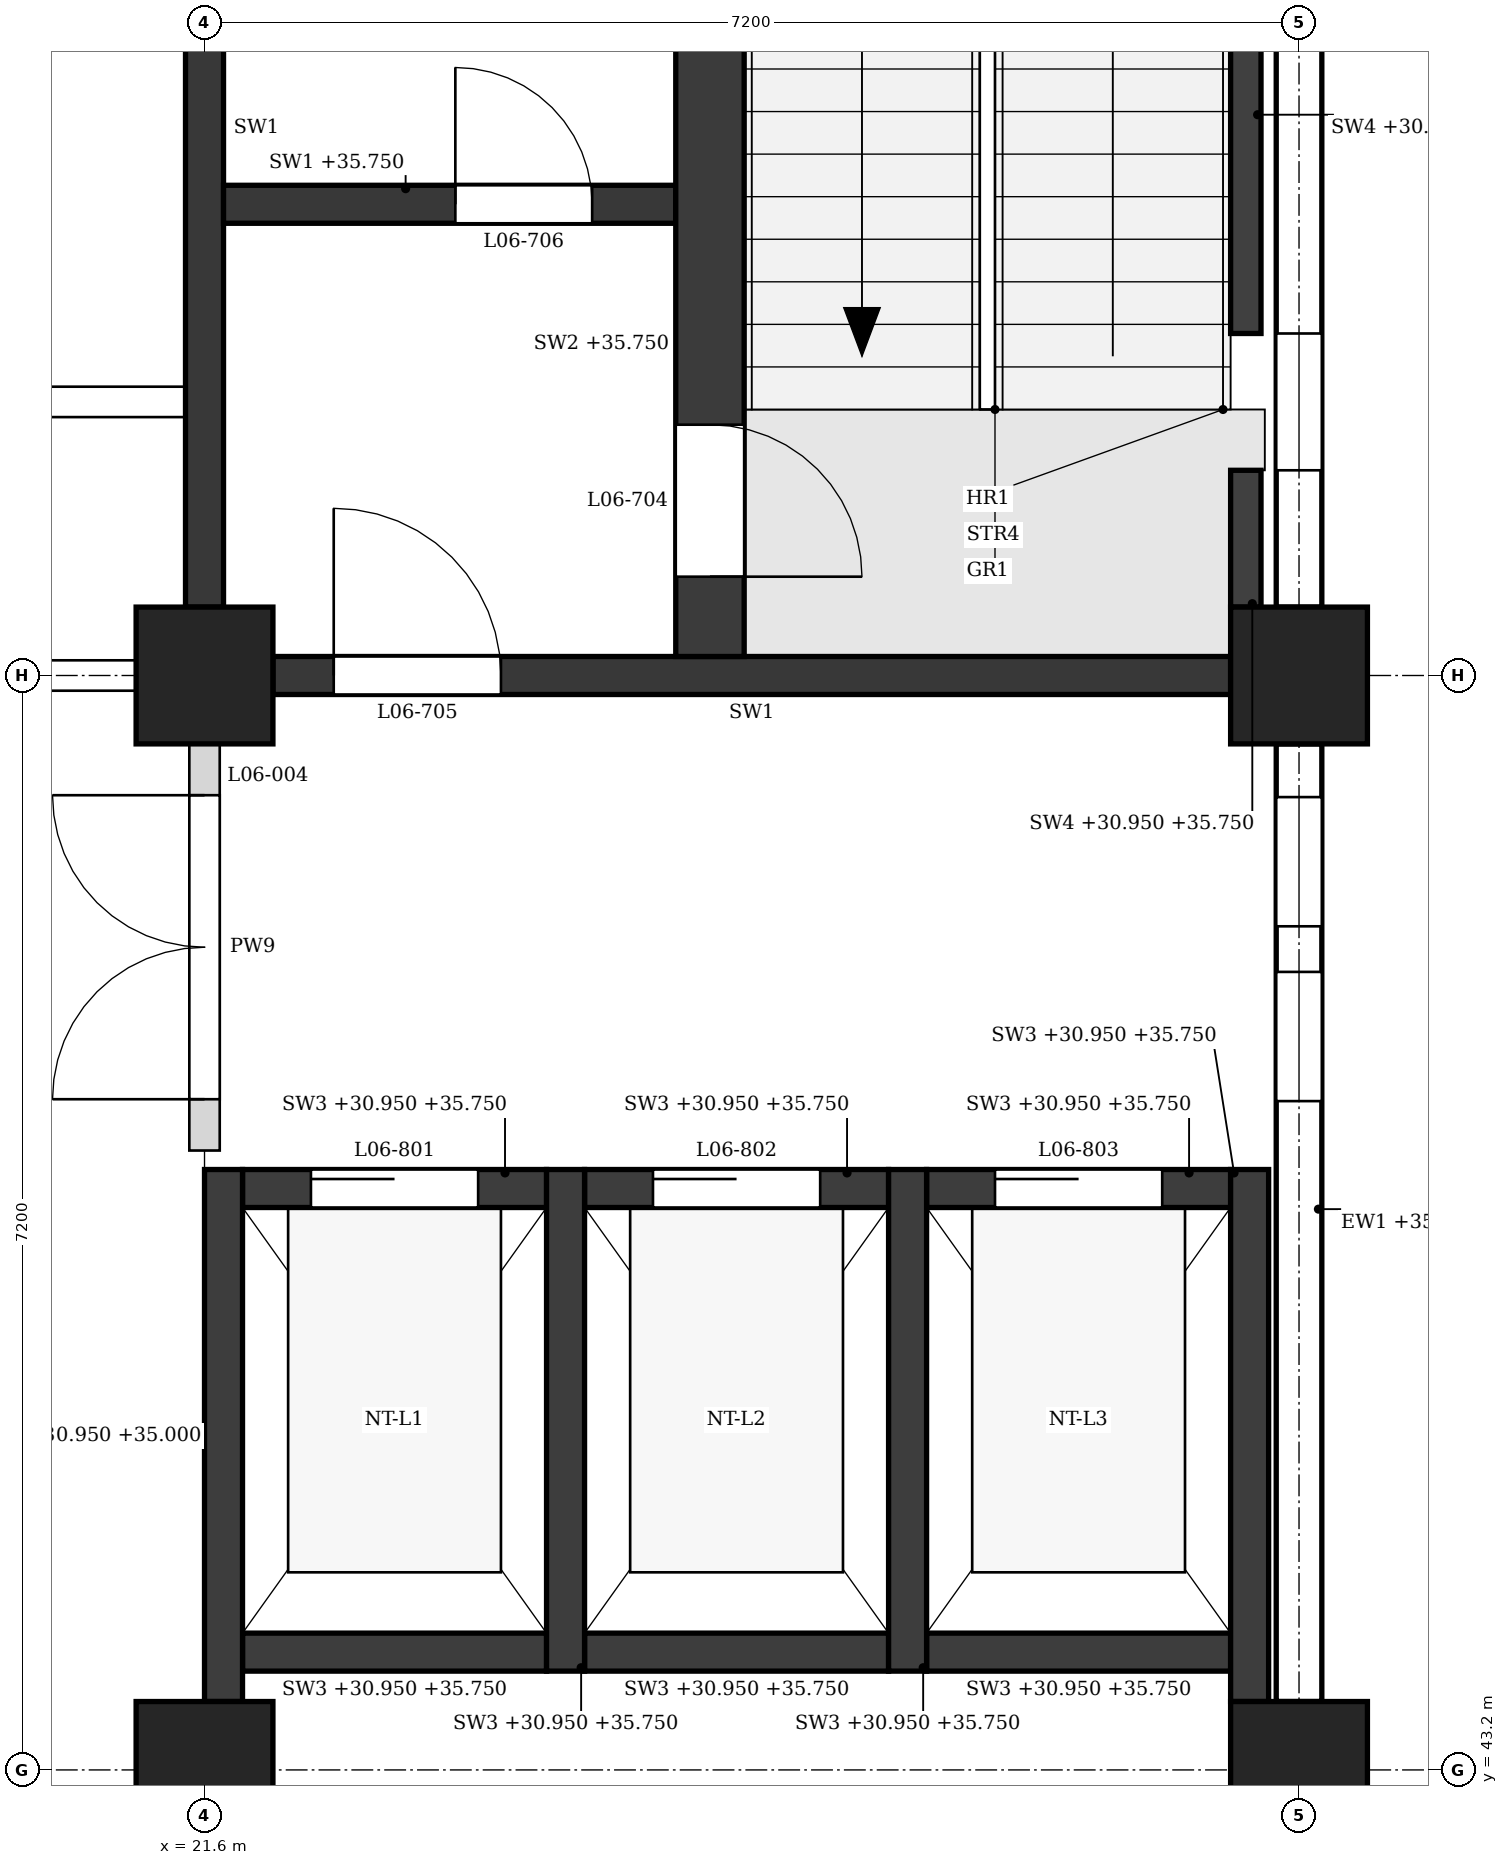
"""IFC4 building model, lengths in metres.
Left out: names, types, materials, properties, quantities, classifications, styles, units other than length and angle.
Written with IfcOpenShell. Run it as: python <this file> out.ifc"""

import sys

from ifc_helpers import new_model, si_unit, direction, frame, frame_2d, origin, origin_2d, place, context, subcontext, project, spatial, polyline, rectangle, outline, extrude, element, fill, save


model = new_model("IFC4")
c1 = context("Model", 3, precision=1e-05, world=origin(), true_north=direction((0.0, 1.0)))
c2 = subcontext(c1, "Body", "Model", "MODEL_VIEW")
j1 = project(units=[si_unit("LENGTHUNIT", "METRE"), si_unit("PLANEANGLEUNIT", "RADIAN")], contexts=[c1])
p1 = place(None, origin())
s1 = spatial("IfcSite", under=j1, at=p1, CompositionType="ELEMENT")
p2 = place(p1, origin())
s2 = spatial("IfcBuilding", under=s1, at=p2, CompositionType="ELEMENT")
p3 = place(p2, frame((0.0, 0.0, 31.2)))
s3 = spatial("IfcBuildingStorey", under=s2, at=p3, CompositionType="ELEMENT", Elevation=31.2)
for number, where, z_axis, x_axis in (
    (1, (21.6, 43.2, 0.0), (0.0, 0.0, 1.0), (1.0, 0.0, 0.0)),
    (2, (21.6, 50.4, 0.0), (0.0, 0.0, 1.0), (1.0, 0.0, 0.0)),
    (3, (28.8, 43.2, 0.0), (0.0, 0.0, 1.0), (1.0, 0.0, 0.0)),
    (4, (28.8, 50.4, 0.0), (0.0, 0.0, 1.0), (1.0, 0.0, 0.0)),
):
    element("IfcColumn", number, at=place(p3, frame(where, z_axis=z_axis, x_axis=x_axis)), inside=s3, PredefinedType="COLUMN", context=c2, shape_type="SweptSolid", body=[
        extrude(rectangle(XDim=0.9, YDim=0.9, at=origin_2d()), origin(), (0.0, 0.0, 1.0), 4.8),
    ])
p4 = place(p3, frame((28.8, 43.65, 0.0), z_axis=(0.0, 0.0, 1.0), x_axis=(0.0, 1.0, 0.0)))
e5 = element("IfcWall", 5, at=p4, inside=s3, PredefinedType="STANDARD", context=c2, shape_type="SweptSolid", body=[
    extrude(rectangle(XDim=6.3, YDim=0.3, at=frame_2d((3.15, 0.0))), origin(), (0.0, 0.0, 1.0), 3.95),
])
p5 = place(p4, frame((3.95, 0.0, 0.9)))
e6 = element("IfcOpeningElement", 6, at=p5, cuts=e5, PredefinedType="OPENING", context=c2, shape_type="SweptSolid", body=[
    extrude(outline(polyline([(0.0, 0.0), (0.85, 0.0), (0.85, 2.05), (0.425, 2.5), (0.0, 2.05), (0.0, 0.0)])), frame((0.0, 0.16, 0.0), z_axis=(0.0, -1.0, 0.0), x_axis=(1.0, 0.0, 0.0)), (0.0, 0.0, 1.0), 0.32),
])
p6 = place(p4, frame((5.1, 0.0, 0.9)))
e7 = element("IfcOpeningElement", 7, at=p6, cuts=e5, PredefinedType="OPENING", context=c2, shape_type="SweptSolid", body=[
    extrude(outline(polyline([(0.0, 0.0), (0.85, 0.0), (0.85, 2.05), (0.425, 2.5), (0.0, 2.05), (0.0, 0.0)])), frame((0.0, 0.16, 0.0), z_axis=(0.0, -1.0, 0.0), x_axis=(1.0, 0.0, 0.0)), (0.0, 0.0, 1.0), 0.32),
])
p7 = place(p3, frame((28.8, 50.85, 0.0), z_axis=(0.0, 0.0, 1.0), x_axis=(0.0, 1.0, 0.0)))
e8 = element("IfcWall", 8, at=p7, inside=s3, PredefinedType="STANDARD", context=c2, shape_type="SweptSolid", body=[
    extrude(rectangle(XDim=6.3, YDim=0.3, at=frame_2d((3.15, 0.0))), origin(), (0.0, 0.0, 1.0), 3.95),
])
p8 = place(p7, frame((0.9, 0.0, 0.9)))
e9 = element("IfcOpeningElement", 9, at=p8, cuts=e8, PredefinedType="OPENING", context=c2, shape_type="SweptSolid", body=[
    extrude(outline(polyline([(0.0, 0.0), (0.9, 0.0), (0.9, 2.05), (0.45, 2.5), (0.0, 2.05), (0.0, 0.0)])), frame((0.0, 0.16, 0.0), z_axis=(0.0, -1.0, 0.0), x_axis=(1.0, 0.0, 0.0)), (0.0, 0.0, 1.0), 0.32),
])
p9 = place(p7, frame((4.5, 0.0, 0.9)))
e10 = element("IfcOpeningElement", 10, at=p9, cuts=e8, PredefinedType="OPENING", context=c2, shape_type="SweptSolid", body=[
    extrude(outline(polyline([(0.0, 0.0), (0.9, 0.0), (0.9, 2.05), (0.45, 2.5), (0.0, 2.05), (0.0, 0.0)])), frame((0.0, 0.16, 0.0), z_axis=(0.0, -1.0, 0.0), x_axis=(1.0, 0.0, 0.0)), (0.0, 0.0, 1.0), 0.32),
])
p10 = place(p3, frame((22.05, 50.4, 0.0), z_axis=(0.0, 0.0, 1.0), x_axis=(1.0, 0.0, 0.0)))
e11 = element("IfcWall", 11, at=p10, inside=s3, PredefinedType="SHEAR", context=c2, shape_type="SweptSolid", body=[
    extrude(rectangle(XDim=6.3, YDim=0.25, at=frame_2d((3.15, 0.0))), origin(), (0.0, 0.0, 1.0), 3.8),
])
p11 = place(p10, frame((0.4, 0.0, 0.0)))
e12 = element("IfcOpeningElement", 12, at=p11, cuts=e11, PredefinedType="OPENING", context=c2, shape_type="SweptSolid", body=[
    extrude(rectangle(XDim=1.1, YDim=2.1, at=frame_2d((0.55, 1.05))), frame((0.0, 0.135, 0.0), z_axis=(0.0, -1.0, 0.0), x_axis=(1.0, 0.0, 0.0)), (0.0, 0.0, 1.0), 0.27),
])
p12 = place(p3, frame((21.6, 50.85, 0.0), z_axis=(0.0, 0.0, 1.0), x_axis=(0.0, 1.0, 0.0)))
e13 = element("IfcWall", 13, at=p12, inside=s3, PredefinedType="SHEAR", context=c2, shape_type="SweptSolid", body=[
    extrude(rectangle(XDim=6.3, YDim=0.25, at=frame_2d((3.15, 0.0))), origin(), (0.0, 0.0, 1.0), 3.8),
])
p13 = place(p3, frame((28.45, 50.85, -0.25), z_axis=(0.0, 0.0, 1.0), x_axis=(0.0, 1.0, 0.0)))
e14 = element("IfcWall", 14, at=p13, inside=s3, PredefinedType="SHEAR", context=c2, shape_type="SweptSolid", body=[
    extrude(rectangle(XDim=0.9, YDim=0.2, at=frame_2d((0.45, 0.0))), origin(), (0.0, 0.0, 1.0), 4.8),
])
p14 = place(p3, frame((28.45, 52.65, -0.25), z_axis=(0.0, 0.0, 1.0), x_axis=(0.0, 1.0, 0.0)))
e15 = element("IfcWall", 15, at=p14, inside=s3, PredefinedType="SHEAR", context=c2, shape_type="SweptSolid", body=[
    extrude(rectangle(XDim=2.7, YDim=0.2, at=frame_2d((1.35, 0.0))), origin(), (0.0, 0.0, 1.0), 4.8),
])
p15 = place(p3, frame((24.925, 50.525, 0.0), z_axis=(0.0, 0.0, 1.0), x_axis=(0.0, 1.0, 0.0)))
e16 = element("IfcWall", 16, at=p15, inside=s3, PredefinedType="SHEAR", context=c2, shape_type="SweptSolid", body=[
    extrude(rectangle(XDim=6.85, YDim=0.45, at=frame_2d((3.425, 0.0))), origin(), (0.0, 0.0, 1.0), 4.55),
])
p16 = place(p15, frame((0.525, 0.0, 0.0)))
e17 = element("IfcOpeningElement", 17, at=p16, cuts=e16, PredefinedType="OPENING", context=c2, shape_type="SweptSolid", body=[
    extrude(rectangle(XDim=1.0, YDim=2.1, at=frame_2d((0.5, 1.05))), frame((0.0, 0.235, 0.0), z_axis=(0.0, -1.0, 0.0), x_axis=(1.0, 0.0, 0.0)), (0.0, 0.0, 1.0), 0.47),
])
p17 = place(p3, frame((21.725, 53.5, 0.0), z_axis=(0.0, 0.0, 1.0), x_axis=(1.0, 0.0, 0.0)))
e18 = element("IfcWall", 18, at=p17, inside=s3, PredefinedType="SHEAR", context=c2, shape_type="SweptSolid", body=[
    extrude(rectangle(XDim=2.975, YDim=0.25, at=frame_2d((1.487, 0.0))), origin(), (0.0, 0.0, 1.0), 4.55),
])
p18 = place(p17, frame((1.525, 0.0, 0.0)))
e19 = element("IfcOpeningElement", 19, at=p18, cuts=e18, PredefinedType="OPENING", context=c2, shape_type="SweptSolid", body=[
    extrude(rectangle(XDim=0.9, YDim=2.1, at=frame_2d((0.45, 1.05))), frame((0.0, 0.135, 0.0), z_axis=(0.0, -1.0, 0.0), x_axis=(1.0, 0.0, 0.0)), (0.0, 0.0, 1.0), 0.27),
])
p19 = place(p3, frame((21.725, 43.65, -0.25), z_axis=(0.0, 0.0, 1.0), x_axis=(0.0, 1.0, 0.0)))
e20 = element("IfcWall", 20, at=p19, inside=s3, PredefinedType="SHEAR", context=c2, shape_type="SweptSolid", body=[
    extrude(rectangle(XDim=3.5, YDim=0.25, at=frame_2d((1.75, 0.0))), origin(), (0.0, 0.0, 1.0), 4.05),
])
for number, where, z_axis, x_axis in (
    (21, (23.975, 43.85, -0.25), (0.0, 0.0, 1.0), (0.0, 1.0, 0.0)),
    (22, (26.225, 43.85, -0.25), (0.0, 0.0, 1.0), (0.0, 1.0, 0.0)),
):
    element("IfcWall", number, at=place(p3, frame(where, z_axis=z_axis, x_axis=x_axis)), inside=s3, PredefinedType="SHEAR", context=c2, shape_type="SweptSolid", body=[
        extrude(rectangle(XDim=3.3, YDim=0.25, at=frame_2d((1.65, 0.0))), origin(), (0.0, 0.0, 1.0), 4.8),
    ])
p20 = place(p3, frame((28.475, 43.65, -0.25), z_axis=(0.0, 0.0, 1.0), x_axis=(0.0, 1.0, 0.0)))
e23 = element("IfcWall", 23, at=p20, inside=s3, PredefinedType="SHEAR", context=c2, shape_type="SweptSolid", body=[
    extrude(rectangle(XDim=3.5, YDim=0.25, at=frame_2d((1.75, 0.0))), origin(), (0.0, 0.0, 1.0), 4.8),
])
p21 = place(p3, frame((21.85, 47.025, -0.25), z_axis=(0.0, 0.0, 1.0), x_axis=(1.0, 0.0, 0.0)))
e24 = element("IfcWall", 24, at=p21, inside=s3, PredefinedType="SHEAR", context=c2, shape_type="SweptSolid", body=[
    extrude(rectangle(XDim=2.0, YDim=0.25, at=frame_2d((1.0, 0.0))), origin(), (0.0, 0.0, 1.0), 4.8),
])
p22 = place(p21, frame((0.45, 0.0, 0.25)))
e25 = element("IfcOpeningElement", 25, at=p22, cuts=e24, PredefinedType="OPENING", context=c2, shape_type="SweptSolid", body=[
    extrude(rectangle(XDim=1.1, YDim=2.1, at=frame_2d((0.55, 1.05))), frame((0.0, 0.135, 0.0), z_axis=(0.0, -1.0, 0.0), x_axis=(1.0, 0.0, 0.0)), (0.0, 0.0, 1.0), 0.27),
])
p23 = place(p3, frame((21.85, 43.975, -0.25), z_axis=(0.0, 0.0, 1.0), x_axis=(1.0, 0.0, 0.0)))
e26 = element("IfcWall", 26, at=p23, inside=s3, PredefinedType="SHEAR", context=c2, shape_type="SweptSolid", body=[
    extrude(rectangle(XDim=2.0, YDim=0.25, at=frame_2d((1.0, 0.0))), origin(), (0.0, 0.0, 1.0), 4.8),
])
p24 = place(p3, frame((24.1, 47.025, -0.25), z_axis=(0.0, 0.0, 1.0), x_axis=(1.0, 0.0, 0.0)))
e27 = element("IfcWall", 27, at=p24, inside=s3, PredefinedType="SHEAR", context=c2, shape_type="SweptSolid", body=[
    extrude(rectangle(XDim=2.0, YDim=0.25, at=frame_2d((1.0, 0.0))), origin(), (0.0, 0.0, 1.0), 4.8),
])
p25 = place(p24, frame((0.45, 0.0, 0.25)))
e28 = element("IfcOpeningElement", 28, at=p25, cuts=e27, PredefinedType="OPENING", context=c2, shape_type="SweptSolid", body=[
    extrude(rectangle(XDim=1.1, YDim=2.1, at=frame_2d((0.55, 1.05))), frame((0.0, 0.135, 0.0), z_axis=(0.0, -1.0, 0.0), x_axis=(1.0, 0.0, 0.0)), (0.0, 0.0, 1.0), 0.27),
])
p26 = place(p3, frame((24.1, 43.975, -0.25), z_axis=(0.0, 0.0, 1.0), x_axis=(1.0, 0.0, 0.0)))
e29 = element("IfcWall", 29, at=p26, inside=s3, PredefinedType="SHEAR", context=c2, shape_type="SweptSolid", body=[
    extrude(rectangle(XDim=2.0, YDim=0.25, at=frame_2d((1.0, 0.0))), origin(), (0.0, 0.0, 1.0), 4.8),
])
p27 = place(p3, frame((26.35, 47.025, -0.25), z_axis=(0.0, 0.0, 1.0), x_axis=(1.0, 0.0, 0.0)))
e30 = element("IfcWall", 30, at=p27, inside=s3, PredefinedType="SHEAR", context=c2, shape_type="SweptSolid", body=[
    extrude(rectangle(XDim=2.0, YDim=0.25, at=frame_2d((1.0, 0.0))), origin(), (0.0, 0.0, 1.0), 4.8),
])
p28 = place(p27, frame((0.45, 0.0, 0.25)))
e31 = element("IfcOpeningElement", 31, at=p28, cuts=e30, PredefinedType="OPENING", context=c2, shape_type="SweptSolid", body=[
    extrude(rectangle(XDim=1.1, YDim=2.1, at=frame_2d((0.55, 1.05))), frame((0.0, 0.135, 0.0), z_axis=(0.0, -1.0, 0.0), x_axis=(1.0, 0.0, 0.0)), (0.0, 0.0, 1.0), 0.27),
])
p29 = place(p3, frame((26.35, 43.975, -0.25), z_axis=(0.0, 0.0, 1.0), x_axis=(1.0, 0.0, 0.0)))
e32 = element("IfcWall", 32, at=p29, inside=s3, PredefinedType="SHEAR", context=c2, shape_type="SweptSolid", body=[
    extrude(rectangle(XDim=2.0, YDim=0.25, at=frame_2d((1.0, 0.0))), origin(), (0.0, 0.0, 1.0), 4.8),
])
p30 = place(p3, frame((14.85, 50.4, 0.0), z_axis=(0.0, 0.0, 1.0), x_axis=(1.0, 0.0, 0.0)))
e33 = element("IfcWall", 33, at=p30, inside=s3, PredefinedType="PARTITIONING", context=c2, shape_type="SweptSolid", body=[
    extrude(rectangle(XDim=6.3, YDim=0.2, at=frame_2d((3.15, 0.0))), origin(), (0.0, 0.0, 1.0), 3.8),
])
p31 = place(p30, frame((4.225, 0.0, 0.0)))
e34 = element("IfcOpeningElement", 34, at=p31, cuts=e33, PredefinedType="OPENING", context=c2, shape_type="SweptSolid", body=[
    extrude(rectangle(XDim=1.0, YDim=2.1, at=frame_2d((0.5, 1.05))), frame((0.0, 0.11, 0.0), z_axis=(0.0, -1.0, 0.0), x_axis=(1.0, 0.0, 0.0)), (0.0, 0.0, 1.0), 0.22),
])
p32 = place(p3, frame((7.325, 52.2, 0.0), z_axis=(0.0, 0.0, 1.0), x_axis=(1.0, 0.0, 0.0)))
e35 = element("IfcWall", 35, at=p32, inside=s3, PredefinedType="PARTITIONING", context=c2, shape_type="SweptSolid", body=[
    extrude(outline(polyline([(0.0, 0.0), (14.15, 0.0), (14.15, 3.8), (14.025, 3.8), (14.025, 4.55), (7.325, 4.55), (7.325, 3.8), (6.825, 3.8), (6.825, 4.55), (0.125, 4.55), (0.125, 3.8), (0.0, 3.8), (0.0, 0.0)])), frame((0.0, 0.1, 0.0), z_axis=(0.0, -1.0, 0.0), x_axis=(1.0, 0.0, 0.0)), (0.0, 0.0, 1.0), 0.2),
])
p33 = place(p32, frame((1.238, 0.0, 0.0)))
e36 = element("IfcOpeningElement", 36, at=p33, cuts=e35, PredefinedType="OPENING", context=c2, shape_type="SweptSolid", body=[
    extrude(rectangle(XDim=1.0, YDim=2.1, at=frame_2d((0.5, 1.05))), frame((0.0, 0.11, 0.0), z_axis=(0.0, -1.0, 0.0), x_axis=(1.0, 0.0, 0.0)), (0.0, 0.0, 1.0), 0.22),
])
p34 = place(p32, frame((4.775, 0.0, 0.0)))
e37 = element("IfcOpeningElement", 37, at=p34, cuts=e35, PredefinedType="OPENING", context=c2, shape_type="SweptSolid", body=[
    extrude(rectangle(XDim=1.0, YDim=2.1, at=frame_2d((0.5, 1.05))), frame((0.0, 0.11, 0.0), z_axis=(0.0, -1.0, 0.0), x_axis=(1.0, 0.0, 0.0)), (0.0, 0.0, 1.0), 0.22),
])
p35 = place(p32, frame((8.375, 0.0, 0.0)))
e38 = element("IfcOpeningElement", 38, at=p35, cuts=e35, PredefinedType="OPENING", context=c2, shape_type="SweptSolid", body=[
    extrude(rectangle(XDim=1.0, YDim=2.1, at=frame_2d((0.5, 1.05))), frame((0.0, 0.11, 0.0), z_axis=(0.0, -1.0, 0.0), x_axis=(1.0, 0.0, 0.0)), (0.0, 0.0, 1.0), 0.22),
])
p36 = place(p32, frame((11.913, 0.0, 0.0)))
e39 = element("IfcOpeningElement", 39, at=p36, cuts=e35, PredefinedType="OPENING", context=c2, shape_type="SweptSolid", body=[
    extrude(rectangle(XDim=1.0, YDim=2.1, at=frame_2d((0.5, 1.05))), frame((0.0, 0.11, 0.0), z_axis=(0.0, -1.0, 0.0), x_axis=(1.0, 0.0, 0.0)), (0.0, 0.0, 1.0), 0.22),
])
p37 = place(p3, frame((21.6, 47.275, 0.0), z_axis=(0.0, 0.0, 1.0), x_axis=(0.0, 1.0, 0.0)))
e40 = element("IfcWall", 40, at=p37, inside=s3, PredefinedType="PARTITIONING", context=c2, shape_type="SweptSolid", body=[
    extrude(rectangle(XDim=2.675, YDim=0.2, at=frame_2d((1.337, 0.0))), origin(), (0.0, 0.0, 1.0), 3.8),
])
p38 = place(p37, frame((0.337, 0.0, 0.0)))
e41 = element("IfcOpeningElement", 41, at=p38, cuts=e40, PredefinedType="OPENING", context=c2, shape_type="SweptSolid", body=[
    extrude(rectangle(XDim=2.0, YDim=2.4, at=frame_2d((1.0, 1.2))), frame((0.0, 0.11, 0.0), z_axis=(0.0, -1.0, 0.0), x_axis=(1.0, 0.0, 0.0)), (0.0, 0.0, 1.0), 0.22),
])
p39 = place(p5, origin())
e42 = element("IfcWindow", 42, at=p39, inside=s3, PartitioningType="SINGLE_PANEL", PredefinedType="WINDOW", context=c2, shape_type="SweptSolid", body=[
    extrude(outline(polyline([(0.0, 0.0), (0.85, 0.0), (0.85, 2.05), (0.425, 2.5), (0.0, 2.05), (0.0, 0.0)])), frame((0.0, 0.03, 0.0), z_axis=(0.0, -1.0, 0.0), x_axis=(1.0, 0.0, 0.0)), (0.0, 0.0, 1.0), 0.06),
])
fill(e6, e42)
p40 = place(p6, origin())
e43 = element("IfcWindow", 43, at=p40, inside=s3, PartitioningType="SINGLE_PANEL", PredefinedType="WINDOW", context=c2, shape_type="SweptSolid", body=[
    extrude(outline(polyline([(0.0, 0.0), (0.85, 0.0), (0.85, 2.05), (0.425, 2.5), (0.0, 2.05), (0.0, 0.0)])), frame((0.0, 0.03, 0.0), z_axis=(0.0, -1.0, 0.0), x_axis=(1.0, 0.0, 0.0)), (0.0, 0.0, 1.0), 0.06),
])
fill(e7, e43)
p41 = place(p8, origin())
e44 = element("IfcWindow", 44, at=p41, inside=s3, PartitioningType="SINGLE_PANEL", PredefinedType="WINDOW", context=c2, shape_type="SweptSolid", body=[
    extrude(outline(polyline([(0.0, 0.0), (0.9, 0.0), (0.9, 2.05), (0.45, 2.5), (0.0, 2.05), (0.0, 0.0)])), frame((0.0, 0.03, 0.0), z_axis=(0.0, -1.0, 0.0), x_axis=(1.0, 0.0, 0.0)), (0.0, 0.0, 1.0), 0.06),
])
fill(e9, e44)
p42 = place(p16, frame((1.0, 0.0, 0.0), z_axis=(0.0, 0.0, 1.0), x_axis=(-1.0, 0.0, 0.0)))
e45 = element("IfcDoor", 45, at=p42, inside=s3, OperationType="SINGLE_SWING_RIGHT", PredefinedType="DOOR", context=c2, shape_type="SweptSolid", body=[
    extrude(rectangle(XDim=1.0, YDim=2.1, at=frame_2d((0.5, 1.05))), frame((0.0, 0.025, 0.0), z_axis=(0.0, -1.0, 0.0), x_axis=(1.0, 0.0, 0.0)), (0.0, 0.0, 1.0), 0.05),
])
fill(e17, e45)
p43 = place(p11, origin())
e46 = element("IfcDoor", 46, at=p43, inside=s3, OperationType="SINGLE_SWING_LEFT", PredefinedType="DOOR", context=c2, shape_type="SweptSolid", body=[
    extrude(rectangle(XDim=1.1, YDim=2.1, at=frame_2d((0.55, 1.05))), frame((0.0, 0.025, 0.0), z_axis=(0.0, -1.0, 0.0), x_axis=(1.0, 0.0, 0.0)), (0.0, 0.0, 1.0), 0.05),
])
fill(e12, e46)
p44 = place(p18, origin())
e47 = element("IfcDoor", 47, at=p44, inside=s3, OperationType="SINGLE_SWING_LEFT", PredefinedType="DOOR", context=c2, shape_type="SweptSolid", body=[
    extrude(rectangle(XDim=0.9, YDim=2.1, at=frame_2d((0.45, 1.05))), frame((0.0, 0.025, 0.0), z_axis=(0.0, -1.0, 0.0), x_axis=(1.0, 0.0, 0.0)), (0.0, 0.0, 1.0), 0.05),
])
fill(e19, e47)
p45 = place(p22, origin())
e48 = element("IfcDoor", 48, at=p45, inside=s3, OperationType="SLIDING_TO_LEFT", PredefinedType="DOOR", context=c2, shape_type="SweptSolid", body=[
    extrude(rectangle(XDim=1.1, YDim=2.1, at=frame_2d((0.55, 1.05))), frame((0.0, 0.025, 0.0), z_axis=(0.0, -1.0, 0.0), x_axis=(1.0, 0.0, 0.0)), (0.0, 0.0, 1.0), 0.05),
])
fill(e25, e48)
p46 = place(p25, origin())
e49 = element("IfcDoor", 49, at=p46, inside=s3, OperationType="SLIDING_TO_LEFT", PredefinedType="DOOR", context=c2, shape_type="SweptSolid", body=[
    extrude(rectangle(XDim=1.1, YDim=2.1, at=frame_2d((0.55, 1.05))), frame((0.0, 0.025, 0.0), z_axis=(0.0, -1.0, 0.0), x_axis=(1.0, 0.0, 0.0)), (0.0, 0.0, 1.0), 0.05),
])
fill(e28, e49)
p47 = place(p28, origin())
e50 = element("IfcDoor", 50, at=p47, inside=s3, OperationType="SLIDING_TO_LEFT", PredefinedType="DOOR", context=c2, shape_type="SweptSolid", body=[
    extrude(rectangle(XDim=1.1, YDim=2.1, at=frame_2d((0.55, 1.05))), frame((0.0, 0.025, 0.0), z_axis=(0.0, -1.0, 0.0), x_axis=(1.0, 0.0, 0.0)), (0.0, 0.0, 1.0), 0.05),
])
fill(e31, e50)
p48 = place(p38, origin())
e51 = element("IfcDoor", 51, at=p48, inside=s3, OperationType="DOUBLE_DOOR_SINGLE_SWING", PredefinedType="DOOR", context=c2, shape_type="SweptSolid", body=[
    extrude(rectangle(XDim=2.0, YDim=2.4, at=frame_2d((1.0, 1.2))), frame((0.0, 0.025, 0.0), z_axis=(0.0, -1.0, 0.0), x_axis=(1.0, 0.0, 0.0)), (0.0, 0.0, 1.0), 0.05),
])
fill(e41, e51)
save(model, sys.argv[1])
